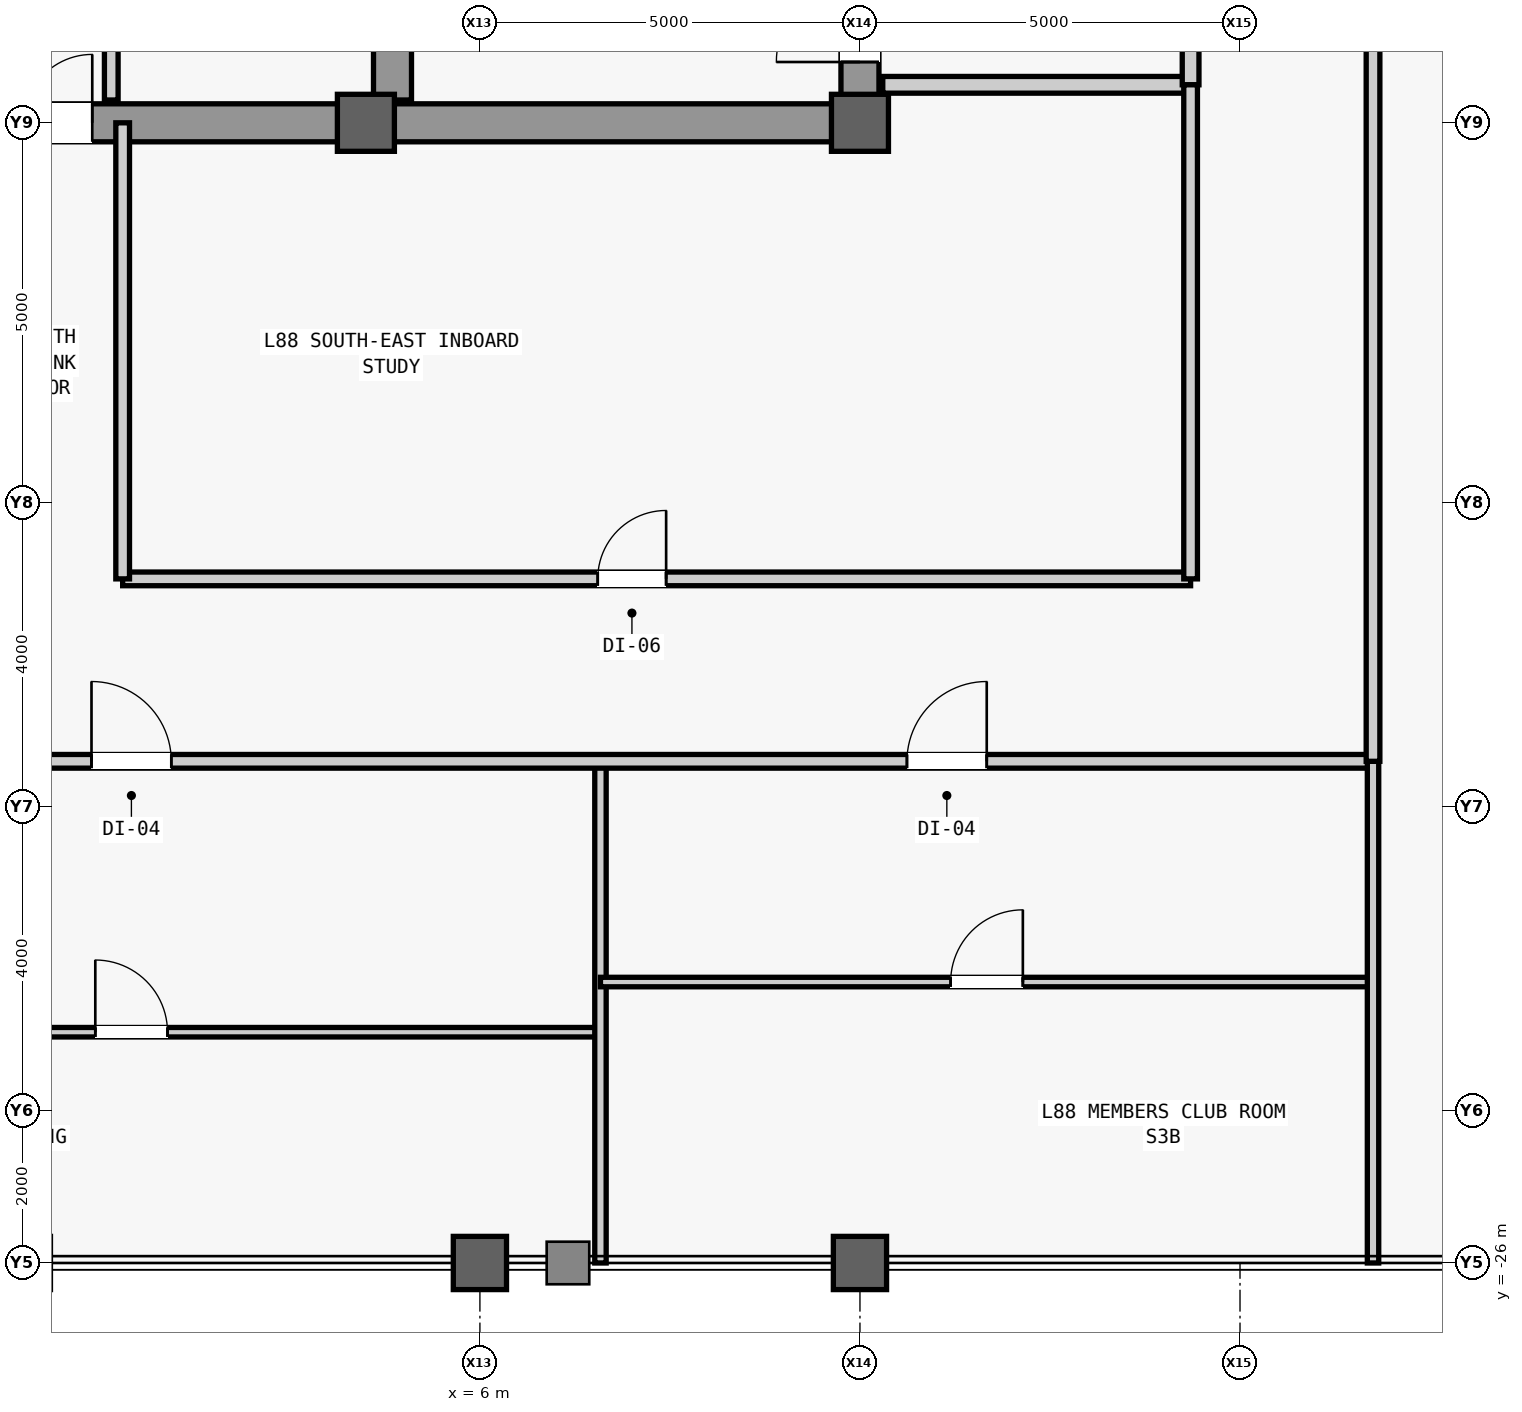
"""IFC4 building model, lengths in metres.
Left out: names, types, materials, properties, quantities, classifications, styles, units other than length and angle.
Written with IfcOpenShell. Run it as: python <this file> out.ifc"""

import sys

from ifc_helpers import new_model, si_unit, direction, frame, frame_2d, origin, origin_2d, place, context, subcontext, project, spatial, rectangle, hollow_rectangle, extrude, source, transform, mapped, element, fill, save


model = new_model("IFC4")
c1 = context("Model", 3, precision=1e-05, world=origin(), true_north=direction((0.0, 1.0)))
c2 = subcontext(c1, "Body", "Model", "MODEL_VIEW")
j1 = project(units=[si_unit("LENGTHUNIT", "METRE"), si_unit("PLANEANGLEUNIT", "RADIAN")], contexts=[c1])
p1 = place(None, origin())
s1 = spatial("IfcSite", under=j1, at=p1, CompositionType="ELEMENT")
p2 = place(p1, origin())
s2 = spatial("IfcBuilding", under=s1, at=p2, CompositionType="ELEMENT")
p3 = place(p2, frame((0.0, 0.0, 370.3)))
s3 = spatial("IfcBuildingStorey", under=s2, at=p3, CompositionType="ELEMENT", Elevation=370.3)
m1 = source(origin(), c2, "Body", "SweptSolid", [
    extrude(rectangle(XDim=22.0, YDim=0.5, at=frame_2d((11.0, 0.0))), origin(), (0.0, 0.0, 1.0), 4.6),
])
p4 = place(p3, frame((11.0, -11.0, 0.0), z_axis=(0.0, 0.0, 1.0), x_axis=(0.0, 1.0, 0.0)))
e1 = element("IfcWall", 1, at=p4, inside=s3, PredefinedType="SHEAR", context=c2, shape_type="MappedRepresentation", body=[
    mapped(m1, transform((0.0, 0.0, 0.0), scale=1.0)),
])
m2 = source(origin(), c2, "Body", "SweptSolid", [
    extrude(rectangle(XDim=1.1, YDim=2.2, at=frame_2d((0.55, 1.1))), frame((0.0, 0.26, 0.0), z_axis=(0.0, -1.0, 0.0), x_axis=(1.0, 0.0, 0.0)), (0.0, 0.0, 1.0), 0.52),
])
p5 = place(p4, frame((0.8, 0.0, 0.0)))
e2 = element("IfcOpeningElement", 2, at=p5, cuts=e1, PredefinedType="OPENING", context=c2, shape_type="MappedRepresentation", body=[
    mapped(m2, transform((0.0, 0.0, 0.0), scale=1.0)),
])
m3 = source(origin(), c2, "Body", "SweptSolid", [
    extrude(rectangle(XDim=0.9, YDim=2.15, at=frame_2d((0.45, 1.075))), frame((0.0, 0.26, 0.0), z_axis=(0.0, -1.0, 0.0), x_axis=(1.0, 0.0, 0.0)), (0.0, 0.0, 1.0), 0.52),
])
p6 = place(p4, frame((7.575, 0.0, 0.0)))
e3 = element("IfcOpeningElement", 3, at=p6, cuts=e1, PredefinedType="OPENING", context=c2, shape_type="MappedRepresentation", body=[
    mapped(m3, transform((0.0, 0.0, 0.0), scale=1.0)),
])
m4 = source(origin(), c2, "Body", "SweptSolid", [
    extrude(rectangle(XDim=1.2, YDim=2.3, at=frame_2d((0.6, 1.15))), frame((0.0, 0.26, 0.0), z_axis=(0.0, -1.0, 0.0), x_axis=(1.0, 0.0, 0.0)), (0.0, 0.0, 1.0), 0.52),
])
p7 = place(p4, frame((17.6, 0.0, 0.0)))
e4 = element("IfcOpeningElement", 4, at=p7, cuts=e1, PredefinedType="OPENING", context=c2, shape_type="MappedRepresentation", body=[
    mapped(m4, transform((0.0, 0.0, 0.0), scale=1.0)),
])
p8 = place(p4, frame((19.6, 0.0, 0.0)))
e5 = element("IfcOpeningElement", 5, at=p8, cuts=e1, PredefinedType="OPENING", context=c2, shape_type="MappedRepresentation", body=[
    mapped(m4, transform((0.0, 0.0, 0.0), scale=1.0)),
])
m5 = source(origin(), c2, "Body", "SweptSolid", [
    extrude(rectangle(XDim=1.3, YDim=2.3, at=frame_2d((0.65, 1.15))), frame((0.0, 0.26, 0.0), z_axis=(0.0, -1.0, 0.0), x_axis=(1.0, 0.0, 0.0)), (0.0, 0.0, 1.0), 0.52),
])
p9 = place(p4, frame((2.7, 0.0, 0.0)))
e6 = element("IfcOpeningElement", 6, at=p9, cuts=e1, PredefinedType="OPENING", context=c2, shape_type="MappedRepresentation", body=[
    mapped(m5, transform((0.0, 0.0, 0.0), scale=1.0)),
])
p10 = place(p4, frame((13.35, 0.0, 0.0)))
e7 = element("IfcOpeningElement", 7, at=p10, cuts=e1, PredefinedType="OPENING", context=c2, shape_type="MappedRepresentation", body=[
    mapped(m5, transform((0.0, 0.0, 0.0), scale=1.0)),
])
m6 = source(origin(), c2, "Body", "SweptSolid", [
    extrude(rectangle(XDim=21.4, YDim=0.5, at=frame_2d((10.7, 0.0))), origin(), (0.0, 0.0, 1.0), 4.6),
])
p11 = place(p3, frame((4.85, -10.7, 0.0), z_axis=(0.0, 0.0, 1.0), x_axis=(0.0, 1.0, 0.0)))
e8 = element("IfcWall", 8, at=p11, inside=s3, PredefinedType="SHEAR", context=c2, shape_type="MappedRepresentation", body=[
    mapped(m6, transform((0.0, 0.0, 0.0), scale=1.0)),
])
m7 = source(origin(), c2, "Body", "SweptSolid", [
    extrude(rectangle(XDim=5.9, YDim=0.5, at=frame_2d((2.95, 0.0))), origin(), (0.0, 0.0, 1.0), 4.6),
])
p12 = place(p3, frame((4.85, -11.0, 0.0), z_axis=(0.0, 0.0, 1.0), x_axis=(1.0, 0.0, 0.0)))
e9 = element("IfcWall", 9, at=p12, inside=s3, PredefinedType="SHEAR", context=c2, shape_type="MappedRepresentation", body=[
    mapped(m7, transform((0.0, 0.0, 0.0), scale=1.0)),
])
m8 = source(origin(), c2, "Body", "SweptSolid", [
    extrude(rectangle(XDim=9.2, YDim=0.5, at=frame_2d((4.6, 0.0))), origin(), (0.0, 0.0, 1.0), 4.6),
])
p13 = place(p3, frame((-4.6, -11.0, 0.0), z_axis=(0.0, 0.0, 1.0), x_axis=(1.0, 0.0, 0.0)))
e10 = element("IfcWall", 10, at=p13, inside=s3, PredefinedType="SHEAR", context=c2, shape_type="MappedRepresentation", body=[
    mapped(m8, transform((0.0, 0.0, 0.0), scale=1.0)),
])
m9 = source(origin(), c2, "Body", "SweptSolid", [
    extrude(rectangle(XDim=1.8, YDim=2.25, at=frame_2d((0.9, 1.125))), frame((0.0, 0.26, 0.0), z_axis=(0.0, -1.0, 0.0), x_axis=(1.0, 0.0, 0.0)), (0.0, 0.0, 1.0), 0.52),
])
p14 = place(p13, frame((3.7, 0.0, 0.0)))
e11 = element("IfcOpeningElement", 11, at=p14, cuts=e10, PredefinedType="OPENING", context=c2, shape_type="MappedRepresentation", body=[
    mapped(m9, transform((0.0, 0.0, 0.0), scale=1.0)),
])
m10 = source(origin(), c2, "Body", "SweptSolid", [
    extrude(rectangle(XDim=0.75, YDim=0.75, at=origin_2d()), origin(), (0.0, 0.0, 1.0), 5.2),
])
p15 = place(p3, frame((4.5, -11.0, 0.0), z_axis=(0.0, 0.0, 1.0), x_axis=(1.0, 0.0, 0.0)))
e12 = element("IfcColumn", 12, at=p15, inside=s3, PredefinedType="COLUMN", context=c2, shape_type="MappedRepresentation", body=[
    mapped(m10, transform((0.0, 0.0, 0.0), scale=1.0)),
])
m11 = source(origin(), c2, "Body", "SweptSolid", [
    extrude(hollow_rectangle(XDim=0.7, YDim=0.7, WallThickness=0.04, at=origin_2d()), origin(), (0.0, 0.0, 1.0), 5.2),
])
for number, where, z_axis, x_axis in (
    (13, (6.0, -26.0, 0.0), (0.0, 0.0, 1.0), (1.0, 0.0, 0.0)),
    (14, (11.0, -26.0, 0.0), (0.0, 0.0, 1.0), (1.0, 0.0, 0.0)),
):
    element("IfcColumn", number, at=place(p3, frame(where, z_axis=z_axis, x_axis=x_axis)), inside=s3, PredefinedType="COLUMN", context=c2, shape_type="MappedRepresentation", body=[
        mapped(m11, transform((0.0, 0.0, 0.0), scale=1.0)),
    ])
p16 = place(p3, frame((11.0, -11.0, 0.0), z_axis=(0.0, 0.0, 1.0), x_axis=(1.0, 0.0, 0.0)))
e15 = element("IfcColumn", 15, at=p16, inside=s3, PredefinedType="COLUMN", context=c2, shape_type="MappedRepresentation", body=[
    mapped(m10, transform((0.0, 0.0, 0.0), scale=1.0)),
])
m12 = source(origin(), c2, "Body", "SweptSolid", [
    extrude(rectangle(XDim=4.05, YDim=0.22, at=frame_2d((2.025, 0.0))), origin(), (0.0, 0.0, 1.0), 4.6),
])
p17 = place(p3, frame((11.3, -10.5, 0.0), z_axis=(0.0, 0.0, 1.0), x_axis=(1.0, 0.0, 0.0)))
e16 = element("IfcWall", 16, at=p17, inside=s3, PredefinedType="PARTITIONING", context=c2, shape_type="MappedRepresentation", body=[
    mapped(m12, transform((0.0, 0.0, 0.0), scale=1.0)),
])
m13 = source(origin(), c2, "Body", "SweptSolid", [
    extrude(rectangle(XDim=4.4, YDim=0.22, at=frame_2d((2.2, 0.0))), origin(), (0.0, 0.0, 1.0), 4.6),
])
p18 = place(p3, frame((15.35, -10.5, 0.0), z_axis=(0.0, 0.0, 1.0), x_axis=(0.0, 1.0, 0.0)))
e17 = element("IfcWall", 17, at=p18, inside=s3, PredefinedType="PARTITIONING", context=c2, shape_type="MappedRepresentation", body=[
    mapped(m13, transform((0.0, 0.0, 0.0), scale=1.0)),
])
m14 = source(origin(), c2, "Body", "SweptSolid", [
    extrude(rectangle(XDim=1.2, YDim=2.2, at=frame_2d((0.6, 1.1))), frame((0.0, 0.12, 0.0), z_axis=(0.0, -1.0, 0.0), x_axis=(1.0, 0.0, 0.0)), (0.0, 0.0, 1.0), 0.24),
])
p19 = place(p18, frame((1.6, 0.0, 0.0)))
e18 = element("IfcOpeningElement", 18, at=p19, cuts=e17, PredefinedType="OPENING", context=c2, shape_type="MappedRepresentation", body=[
    mapped(m14, transform((0.0, 0.0, 0.0), scale=1.0)),
])
m15 = source(origin(), c2, "Body", "SweptSolid", [
    extrude(rectangle(XDim=5.4, YDim=0.18, at=frame_2d((2.7, 0.0))), origin(), (0.0, 0.0, 1.0), 4.6),
])
p20 = place(p3, frame((1.15, -10.7, 0.0), z_axis=(0.0, 0.0, 1.0), x_axis=(0.0, 1.0, 0.0)))
e19 = element("IfcWall", 19, at=p20, inside=s3, PredefinedType="PARTITIONING", context=c2, shape_type="MappedRepresentation", body=[
    mapped(m15, transform((0.0, 0.0, 0.0), scale=1.0)),
])
m16 = source(origin(), c2, "Body", "SweptSolid", [
    extrude(rectangle(XDim=0.9, YDim=2.15, at=frame_2d((0.45, 1.075))), frame((0.0, 0.1, 0.0), z_axis=(0.0, -1.0, 0.0), x_axis=(1.0, 0.0, 0.0)), (0.0, 0.0, 1.0), 0.2),
])
p21 = place(p20, frame((2.25, 0.0, 0.0)))
e20 = element("IfcOpeningElement", 20, at=p21, cuts=e19, PredefinedType="OPENING", context=c2, shape_type="MappedRepresentation", body=[
    mapped(m16, transform((0.0, 0.0, 0.0), scale=1.0)),
])
m17 = source(origin(), c2, "Body", "SweptSolid", [
    extrude(rectangle(XDim=14.05, YDim=0.18, at=frame_2d((7.025, 0.0))), origin(), (0.0, 0.0, 1.0), 4.6),
])
p22 = place(p3, frame((1.3, -17.0, 0.0), z_axis=(0.0, 0.0, 1.0), x_axis=(1.0, 0.0, 0.0)))
e21 = element("IfcWall", 21, at=p22, inside=s3, PredefinedType="PARTITIONING", context=c2, shape_type="MappedRepresentation", body=[
    mapped(m17, transform((0.0, 0.0, 0.0), scale=1.0)),
])
p23 = place(p22, frame((6.25, 0.0, 0.0)))
e22 = element("IfcOpeningElement", 22, at=p23, cuts=e21, PredefinedType="OPENING", context=c2, shape_type="MappedRepresentation", body=[
    mapped(m16, transform((0.0, 0.0, 0.0), scale=1.0)),
])
m18 = source(origin(), c2, "Body", "SweptSolid", [
    extrude(rectangle(XDim=6.0, YDim=0.18, at=frame_2d((3.0, 0.0))), origin(), (0.0, 0.0, 1.0), 4.6),
])
p24 = place(p3, frame((1.3, -17.0, 0.0), z_axis=(0.0, 0.0, 1.0), x_axis=(0.0, 1.0, 0.0)))
e23 = element("IfcWall", 23, at=p24, inside=s3, PredefinedType="PARTITIONING", context=c2, shape_type="MappedRepresentation", body=[
    mapped(m18, transform((0.0, 0.0, 0.0), scale=1.0)),
])
m19 = source(origin(), c2, "Body", "SweptSolid", [
    extrude(rectangle(XDim=6.5, YDim=0.18, at=frame_2d((3.25, 0.0))), origin(), (0.0, 0.0, 1.0), 4.6),
])
p25 = place(p3, frame((15.35, -17.0, 0.0), z_axis=(0.0, 0.0, 1.0), x_axis=(0.0, 1.0, 0.0)))
e24 = element("IfcWall", 24, at=p25, inside=s3, PredefinedType="PARTITIONING", context=c2, shape_type="MappedRepresentation", body=[
    mapped(m19, transform((0.0, 0.0, 0.0), scale=1.0)),
])
m20 = source(origin(), c2, "Body", "SweptSolid", [
    extrude(rectangle(XDim=12.342, YDim=0.125, at=frame_2d((6.171, 0.0))), origin(), (0.0, 0.0, 1.0), 4.6),
])
p26 = place(p3, frame((-4.756, -22.964, 0.0), z_axis=(0.0, 0.0, 1.0), x_axis=(1.0, 0.0, 0.0)))
e25 = element("IfcWall", 25, at=p26, inside=s3, PredefinedType="PARTITIONING", context=c2, shape_type="MappedRepresentation", body=[
    mapped(m20, transform((0.0, 0.0, 0.0), scale=1.0)),
])
m21 = source(origin(), c2, "Body", "SweptSolid", [
    extrude(rectangle(XDim=0.95, YDim=2.15, at=frame_2d((0.475, 1.075))), frame((0.0, 0.073, 0.0), z_axis=(0.0, -1.0, 0.0), x_axis=(1.0, 0.0, 0.0)), (0.0, 0.0, 1.0), 0.145),
])
p27 = place(p26, frame((5.696, 0.0, 0.0)))
e26 = element("IfcOpeningElement", 26, at=p27, cuts=e25, PredefinedType="OPENING", context=c2, shape_type="MappedRepresentation", body=[
    mapped(m21, transform((0.0, 0.0, 0.0), scale=1.0)),
])
m22 = source(origin(), c2, "Body", "SweptSolid", [
    extrude(rectangle(XDim=6.6, YDim=0.15, at=frame_2d((3.3, 0.0))), origin(), (0.0, 0.0, 1.0), 4.6),
])
p28 = place(p3, frame((7.586, -26.0, 0.0), z_axis=(0.0, 0.0, 1.0), x_axis=(0.0, 1.0, 0.0)))
e27 = element("IfcWall", 27, at=p28, inside=s3, PredefinedType="PARTITIONING", context=c2, shape_type="MappedRepresentation", body=[
    mapped(m22, transform((0.0, 0.0, 0.0), scale=1.0)),
])
m23 = source(origin(), c2, "Body", "SweptSolid", [
    extrude(rectangle(XDim=10.164, YDim=0.125, at=frame_2d((5.082, 0.0))), origin(), (0.0, 0.0, 1.0), 4.6),
])
p29 = place(p3, frame((7.586, -22.304, 0.0), z_axis=(0.0, 0.0, 1.0), x_axis=(1.0, 0.0, 0.0)))
e28 = element("IfcWall", 28, at=p29, inside=s3, PredefinedType="PARTITIONING", context=c2, shape_type="MappedRepresentation", body=[
    mapped(m23, transform((0.0, 0.0, 0.0), scale=1.0)),
])
p30 = place(p29, frame((4.607, 0.0, 0.0)))
e29 = element("IfcOpeningElement", 29, at=p30, cuts=e28, PredefinedType="OPENING", context=c2, shape_type="MappedRepresentation", body=[
    mapped(m21, transform((0.0, 0.0, 0.0), scale=1.0)),
])
m24 = source(origin(), c2, "Body", "SweptSolid", [
    extrude(rectangle(XDim=36.3, YDim=0.18, at=frame_2d((18.15, 0.0))), origin(), (0.0, 0.0, 1.0), 4.253),
])
p31 = place(p3, frame((-18.55, -19.4, 0.0), z_axis=(0.0, 0.0, 1.0), x_axis=(1.0, 0.0, 0.0)))
e30 = element("IfcWall", 30, at=p31, inside=s3, PredefinedType="PARTITIONING", context=c2, shape_type="MappedRepresentation", body=[
    mapped(m24, transform((0.0, 0.0, 0.0), scale=1.0)),
])
m25 = source(origin(), c2, "Body", "SweptSolid", [
    extrude(rectangle(XDim=1.05, YDim=2.2, at=frame_2d((0.525, 1.1))), frame((0.0, 0.1, 0.0), z_axis=(0.0, -1.0, 0.0), x_axis=(1.0, 0.0, 0.0)), (0.0, 0.0, 1.0), 0.2),
])
p32 = place(p31, frame((6.872, 0.0, 0.0)))
e31 = element("IfcOpeningElement", 31, at=p32, cuts=e30, PredefinedType="OPENING", context=c2, shape_type="MappedRepresentation", body=[
    mapped(m25, transform((0.0, 0.0, 0.0), scale=1.0)),
])
p33 = place(p31, frame((19.44, 0.0, 0.0)))
e32 = element("IfcOpeningElement", 32, at=p33, cuts=e30, PredefinedType="OPENING", context=c2, shape_type="MappedRepresentation", body=[
    mapped(m25, transform((0.0, 0.0, 0.0), scale=1.0)),
])
p34 = place(p31, frame((30.168, 0.0, 0.0)))
e33 = element("IfcOpeningElement", 33, at=p34, cuts=e30, PredefinedType="OPENING", context=c2, shape_type="MappedRepresentation", body=[
    mapped(m25, transform((0.0, 0.0, 0.0), scale=1.0)),
])
m26 = source(origin(), c2, "Body", "SweptSolid", [
    extrude(rectangle(XDim=6.6, YDim=0.15, at=frame_2d((3.3, 0.0))), origin(), (0.0, 0.0, 1.0), 2.8),
])
p35 = place(p3, frame((17.75, -26.0, 0.0), z_axis=(0.0, 0.0, 1.0), x_axis=(0.0, 1.0, 0.0)))
e34 = element("IfcWall", 34, at=p35, inside=s3, PredefinedType="PARTITIONING", context=c2, shape_type="MappedRepresentation", body=[
    mapped(m26, transform((0.0, 0.0, 0.0), scale=1.0)),
])
m27 = source(origin(), c2, "Body", "SweptSolid", [
    extrude(rectangle(XDim=39.4, YDim=0.18, at=frame_2d((19.7, 0.0))), origin(), (0.0, 0.0, 1.0), 2.8),
])
p36 = place(p3, frame((17.75, -19.4, 0.0), z_axis=(0.0, 0.0, 1.0), x_axis=(0.0, 1.0, 0.0)))
e35 = element("IfcWall", 35, at=p36, inside=s3, PredefinedType="PARTITIONING", context=c2, shape_type="MappedRepresentation", body=[
    mapped(m27, transform((0.0, 0.0, 0.0), scale=1.0)),
])
m28 = source(origin(), c2, "Body", "SweptSolid", [
    extrude(rectangle(XDim=0.95, YDim=2.15, at=frame_2d((0.475, 1.075))), frame((0.0, 0.1, 0.0), z_axis=(0.0, -1.0, 0.0), x_axis=(1.0, 0.0, 0.0)), (0.0, 0.0, 1.0), 0.2),
])
p37 = place(p36, frame((17.225, 0.0, 0.0)))
e36 = element("IfcOpeningElement", 36, at=p37, cuts=e35, PredefinedType="OPENING", context=c2, shape_type="MappedRepresentation", body=[
    mapped(m28, transform((0.0, 0.0, 0.0), scale=1.0)),
])
m29 = source(origin(), c2, "Body", "SweptSolid", [
    extrude(rectangle(XDim=1.1, YDim=2.2, at=frame_2d((0.55, 1.1))), frame((0.0, 0.025, 0.0), z_axis=(0.0, -1.0, 0.0), x_axis=(1.0, 0.0, 0.0)), (0.0, 0.0, 1.0), 0.05),
])
p38 = place(p5, origin())
e37 = element("IfcDoor", 37, at=p38, inside=s3, OperationType="SINGLE_SWING_LEFT", PredefinedType="DOOR", context=c2, shape_type="MappedRepresentation", body=[
    mapped(m29, transform((0.0, 0.0, 0.0), scale=1.0)),
])
fill(e2, e37)
m30 = source(origin(), c2, "Body", "SweptSolid", [
    extrude(rectangle(XDim=1.8, YDim=2.25, at=frame_2d((0.9, 1.125))), frame((0.0, 0.025, 0.0), z_axis=(0.0, -1.0, 0.0), x_axis=(1.0, 0.0, 0.0)), (0.0, 0.0, 1.0), 0.05),
])
p39 = place(p14, origin())
e38 = element("IfcDoor", 38, at=p39, inside=s3, OperationType="SINGLE_SWING_LEFT", PredefinedType="DOOR", context=c2, shape_type="MappedRepresentation", body=[
    mapped(m30, transform((0.0, 0.0, 0.0), scale=1.0)),
])
fill(e11, e38)
m31 = source(origin(), c2, "Body", "SweptSolid", [
    extrude(rectangle(XDim=0.9, YDim=2.15, at=frame_2d((0.45, 1.075))), frame((0.0, 0.025, 0.0), z_axis=(0.0, -1.0, 0.0), x_axis=(1.0, 0.0, 0.0)), (0.0, 0.0, 1.0), 0.05),
])
p40 = place(p23, origin())
e39 = element("IfcDoor", 39, at=p40, inside=s3, OperationType="SINGLE_SWING_RIGHT", PredefinedType="DOOR", context=c2, shape_type="MappedRepresentation", body=[
    mapped(m31, transform((0.0, 0.0, 0.0), scale=1.0)),
])
fill(e22, e39)
m32 = source(origin(), c2, "Body", "SweptSolid", [
    extrude(rectangle(XDim=0.95, YDim=2.15, at=frame_2d((0.475, 1.075))), frame((0.0, 0.025, 0.0), z_axis=(0.0, -1.0, 0.0), x_axis=(1.0, 0.0, 0.0)), (0.0, 0.0, 1.0), 0.05),
])
p41 = place(p27, origin())
e40 = element("IfcDoor", 40, at=p41, inside=s3, OperationType="SINGLE_SWING_LEFT", PredefinedType="DOOR", context=c2, shape_type="MappedRepresentation", body=[
    mapped(m32, transform((0.0, 0.0, 0.0), scale=1.0)),
])
fill(e26, e40)
p42 = place(p30, origin())
e41 = element("IfcDoor", 41, at=p42, inside=s3, OperationType="SINGLE_SWING_RIGHT", PredefinedType="DOOR", context=c2, shape_type="MappedRepresentation", body=[
    mapped(m32, transform((0.0, 0.0, 0.0), scale=1.0)),
])
fill(e29, e41)
m33 = source(origin(), c2, "Body", "SweptSolid", [
    extrude(rectangle(XDim=1.05, YDim=2.2, at=frame_2d((0.525, 1.1))), frame((0.0, 0.025, 0.0), z_axis=(0.0, -1.0, 0.0), x_axis=(1.0, 0.0, 0.0)), (0.0, 0.0, 1.0), 0.05),
])
p43 = place(p33, origin())
e42 = element("IfcDoor", 42, at=p43, inside=s3, OperationType="SINGLE_SWING_LEFT", PredefinedType="DOOR", context=c2, shape_type="MappedRepresentation", body=[
    mapped(m33, transform((0.0, 0.0, 0.0), scale=1.0)),
])
fill(e32, e42)
p44 = place(p34, origin())
e43 = element("IfcDoor", 43, at=p44, inside=s3, OperationType="SINGLE_SWING_RIGHT", PredefinedType="DOOR", context=c2, shape_type="MappedRepresentation", body=[
    mapped(m33, transform((0.0, 0.0, 0.0), scale=1.0)),
])
fill(e33, e43)
save(model, sys.argv[1])
